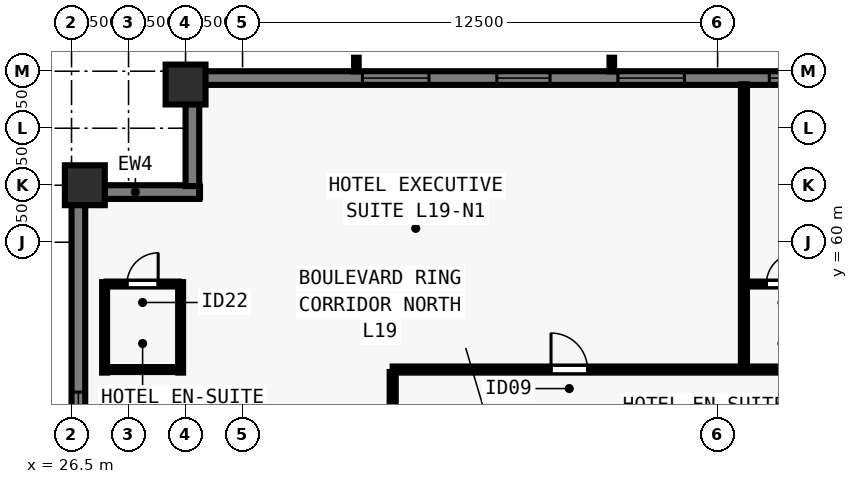
"""IFC4 building model, lengths in metres.
Left out: names, types, materials, properties, quantities, classifications, styles, units other than length and angle.
Written with IfcOpenShell. Run it as: python <this file> out.ifc"""

import sys

from ifc_helpers import new_model, si_unit, direction, frame, frame_2d, origin, origin_2d, place, context, subcontext, project, spatial, rectangle, extrude, element, fill, save


model = new_model("IFC4")
c1 = context("Model", 3, precision=1e-05, world=origin(), true_north=direction((0.0, 1.0)))
c2 = subcontext(c1, "Body", "Model", "MODEL_VIEW")
j1 = project(units=[si_unit("LENGTHUNIT", "METRE"), si_unit("PLANEANGLEUNIT", "RADIAN")], contexts=[c1])
p1 = place(None, origin())
s1 = spatial("IfcSite", under=j1, at=p1, CompositionType="ELEMENT")
p2 = place(p1, origin())
s2 = spatial("IfcBuilding", under=s1, at=p2, CompositionType="ELEMENT")
p3 = place(p2, frame((0.0, 0.0, 72.5)))
s3 = spatial("IfcBuildingStorey", under=s2, at=p3, CompositionType="ELEMENT", Elevation=72.5)
for number, where, z_axis, x_axis in (
    (1, (29.5, 64.15, 0.0), (0.0, 0.0, 1.0), (1.0, 0.0, 0.0)),
    (2, (26.85, 61.5, 0.0), (0.0, 0.0, 1.0), (0.0, 1.0, 0.0)),
):
    element("IfcColumn", number, at=place(p3, frame(where, z_axis=z_axis, x_axis=x_axis)), inside=s3, PredefinedType="COLUMN", context=c2, shape_type="SweptSolid", body=[
        extrude(rectangle(XDim=1.05, YDim=1.05, at=origin_2d()), origin(), (0.0, 0.0, 1.0), 3.5),
    ])
p4 = place(p3, frame((26.68, 16.5, 0.0), z_axis=(0.0, 0.0, 1.0), x_axis=(0.0, 1.0, 0.0)))
e3 = element("IfcWall", 3, at=p4, inside=s3, PredefinedType="SOLIDWALL", context=c2, shape_type="SweptSolid", body=[
    extrude(rectangle(XDim=44.662, YDim=0.36, at=frame_2d((22.331, 0.0))), origin(), (0.0, 0.0, 1.0), 3.28),
])
p5 = place(p4, frame((5.505, 0.0, 0.8)))
e4 = element("IfcOpeningElement", 4, at=p5, cuts=e3, PredefinedType="OPENING", context=c2, shape_type="SweptSolid", body=[
    extrude(rectangle(XDim=1.75, YDim=1.544, at=frame_2d((0.875, 0.772))), frame((0.0, 0.19, 0.0), z_axis=(0.0, -1.0, 0.0), x_axis=(1.0, 0.0, 0.0)), (0.0, 0.0, 1.0), 0.38),
])
p6 = place(p4, frame((8.19, 0.0, 0.8)))
e5 = element("IfcOpeningElement", 5, at=p6, cuts=e3, PredefinedType="OPENING", context=c2, shape_type="SweptSolid", body=[
    extrude(rectangle(XDim=1.4, YDim=1.544, at=frame_2d((0.7, 0.772))), frame((0.0, 0.19, 0.0), z_axis=(0.0, -1.0, 0.0), x_axis=(1.0, 0.0, 0.0)), (0.0, 0.0, 1.0), 0.38),
])
p7 = place(p4, frame((11.375, 0.0, 0.8)))
e6 = element("IfcOpeningElement", 6, at=p7, cuts=e3, PredefinedType="OPENING", context=c2, shape_type="SweptSolid", body=[
    extrude(rectangle(XDim=1.75, YDim=1.544, at=frame_2d((0.875, 0.772))), frame((0.0, 0.19, 0.0), z_axis=(0.0, -1.0, 0.0), x_axis=(1.0, 0.0, 0.0)), (0.0, 0.0, 1.0), 0.38),
])
p8 = place(p4, frame((14.911, 0.0, 0.8)))
e7 = element("IfcOpeningElement", 7, at=p8, cuts=e3, PredefinedType="OPENING", context=c2, shape_type="SweptSolid", body=[
    extrude(rectangle(XDim=1.4, YDim=1.544, at=frame_2d((0.7, 0.772))), frame((0.0, 0.19, 0.0), z_axis=(0.0, -1.0, 0.0), x_axis=(1.0, 0.0, 0.0)), (0.0, 0.0, 1.0), 0.38),
])
p9 = place(p4, frame((18.546, 0.0, 0.8)))
e8 = element("IfcOpeningElement", 8, at=p9, cuts=e3, PredefinedType="OPENING", context=c2, shape_type="SweptSolid", body=[
    extrude(rectangle(XDim=1.75, YDim=1.544, at=frame_2d((0.875, 0.772))), frame((0.0, 0.19, 0.0), z_axis=(0.0, -1.0, 0.0), x_axis=(1.0, 0.0, 0.0)), (0.0, 0.0, 1.0), 0.38),
])
p10 = place(p4, frame((22.481, 0.0, 0.8)))
e9 = element("IfcOpeningElement", 9, at=p10, cuts=e3, PredefinedType="OPENING", context=c2, shape_type="SweptSolid", body=[
    extrude(rectangle(XDim=1.4, YDim=1.544, at=frame_2d((0.7, 0.772))), frame((0.0, 0.19, 0.0), z_axis=(0.0, -1.0, 0.0), x_axis=(1.0, 0.0, 0.0)), (0.0, 0.0, 1.0), 0.38),
])
p11 = place(p4, frame((24.366, 0.0, 0.8)))
e10 = element("IfcOpeningElement", 10, at=p11, cuts=e3, PredefinedType="OPENING", context=c2, shape_type="SweptSolid", body=[
    extrude(rectangle(XDim=1.75, YDim=1.544, at=frame_2d((0.875, 0.772))), frame((0.0, 0.19, 0.0), z_axis=(0.0, -1.0, 0.0), x_axis=(1.0, 0.0, 0.0)), (0.0, 0.0, 1.0), 0.38),
])
p12 = place(p4, frame((28.351, 0.0, 0.8)))
e11 = element("IfcOpeningElement", 11, at=p12, cuts=e3, PredefinedType="OPENING", context=c2, shape_type="SweptSolid", body=[
    extrude(rectangle(XDim=1.4, YDim=1.544, at=frame_2d((0.7, 0.772))), frame((0.0, 0.19, 0.0), z_axis=(0.0, -1.0, 0.0), x_axis=(1.0, 0.0, 0.0)), (0.0, 0.0, 1.0), 0.38),
])
p13 = place(p4, frame((31.537, 0.0, 0.8)))
e12 = element("IfcOpeningElement", 12, at=p13, cuts=e3, PredefinedType="OPENING", context=c2, shape_type="SweptSolid", body=[
    extrude(rectangle(XDim=1.75, YDim=1.544, at=frame_2d((0.875, 0.772))), frame((0.0, 0.19, 0.0), z_axis=(0.0, -1.0, 0.0), x_axis=(1.0, 0.0, 0.0)), (0.0, 0.0, 1.0), 0.38),
])
p14 = place(p4, frame((35.072, 0.0, 0.8)))
e13 = element("IfcOpeningElement", 13, at=p14, cuts=e3, PredefinedType="OPENING", context=c2, shape_type="SweptSolid", body=[
    extrude(rectangle(XDim=1.4, YDim=1.544, at=frame_2d((0.7, 0.772))), frame((0.0, 0.19, 0.0), z_axis=(0.0, -1.0, 0.0), x_axis=(1.0, 0.0, 0.0)), (0.0, 0.0, 1.0), 0.38),
])
p15 = place(p4, frame((37.807, 0.0, 0.8)))
e14 = element("IfcOpeningElement", 14, at=p15, cuts=e3, PredefinedType="OPENING", context=c2, shape_type="SweptSolid", body=[
    extrude(rectangle(XDim=1.75, YDim=1.544, at=frame_2d((0.875, 0.772))), frame((0.0, 0.19, 0.0), z_axis=(0.0, -1.0, 0.0), x_axis=(1.0, 0.0, 0.0)), (0.0, 0.0, 1.0), 0.38),
])
p16 = place(p3, frame((26.5, 61.32, 0.0), z_axis=(0.0, 0.0, 1.0), x_axis=(1.0, 0.0, 0.0)))
e15 = element("IfcWall", 15, at=p16, inside=s3, PredefinedType="SOLIDWALL", context=c2, shape_type="SweptSolid", body=[
    extrude(rectangle(XDim=3.36, YDim=0.36, at=frame_2d((1.68, 0.0))), origin(), (0.0, 0.0, 1.0), 3.28),
])
p17 = place(p3, frame((29.68, 61.478, 0.0), z_axis=(0.0, 0.0, 1.0), x_axis=(0.0, 1.0, 0.0)))
e16 = element("IfcWall", 16, at=p17, inside=s3, PredefinedType="SOLIDWALL", context=c2, shape_type="SweptSolid", body=[
    extrude(rectangle(XDim=2.684, YDim=0.36, at=frame_2d((1.342, 0.0))), origin(), (0.0, 0.0, 1.0), 3.28),
])
p18 = place(p3, frame((29.5, 64.32, 0.0), z_axis=(0.0, 0.0, 1.0), x_axis=(1.0, 0.0, 0.0)))
e17 = element("IfcWall", 17, at=p18, inside=s3, PredefinedType="SOLIDWALL", context=c2, shape_type="SweptSolid", body=[
    extrude(rectangle(XDim=44.662, YDim=0.36, at=frame_2d((22.331, 0.0))), origin(), (0.0, 0.0, 1.0), 3.28),
])
p19 = place(p18, frame((4.655, 0.0, 0.8)))
e18 = element("IfcOpeningElement", 18, at=p19, cuts=e17, PredefinedType="OPENING", context=c2, shape_type="SweptSolid", body=[
    extrude(rectangle(XDim=1.75, YDim=1.544, at=frame_2d((0.875, 0.772))), frame((0.0, 0.19, 0.0), z_axis=(0.0, -1.0, 0.0), x_axis=(1.0, 0.0, 0.0)), (0.0, 0.0, 1.0), 0.38),
])
p20 = place(p18, frame((8.19, 0.0, 0.8)))
e19 = element("IfcOpeningElement", 19, at=p20, cuts=e17, PredefinedType="OPENING", context=c2, shape_type="SweptSolid", body=[
    extrude(rectangle(XDim=1.4, YDim=1.544, at=frame_2d((0.7, 0.772))), frame((0.0, 0.19, 0.0), z_axis=(0.0, -1.0, 0.0), x_axis=(1.0, 0.0, 0.0)), (0.0, 0.0, 1.0), 0.38),
])
p21 = place(p18, frame((11.375, 0.0, 0.8)))
e20 = element("IfcOpeningElement", 20, at=p21, cuts=e17, PredefinedType="OPENING", context=c2, shape_type="SweptSolid", body=[
    extrude(rectangle(XDim=1.75, YDim=1.544, at=frame_2d((0.875, 0.772))), frame((0.0, 0.19, 0.0), z_axis=(0.0, -1.0, 0.0), x_axis=(1.0, 0.0, 0.0)), (0.0, 0.0, 1.0), 0.38),
])
p22 = place(p18, frame((15.361, 0.0, 0.8)))
e21 = element("IfcOpeningElement", 21, at=p22, cuts=e17, PredefinedType="OPENING", context=c2, shape_type="SweptSolid", body=[
    extrude(rectangle(XDim=1.4, YDim=1.544, at=frame_2d((0.7, 0.772))), frame((0.0, 0.19, 0.0), z_axis=(0.0, -1.0, 0.0), x_axis=(1.0, 0.0, 0.0)), (0.0, 0.0, 1.0), 0.38),
])
p23 = place(p18, frame((18.546, 0.0, 0.8)))
e22 = element("IfcOpeningElement", 22, at=p23, cuts=e17, PredefinedType="OPENING", context=c2, shape_type="SweptSolid", body=[
    extrude(rectangle(XDim=1.75, YDim=1.544, at=frame_2d((0.875, 0.772))), frame((0.0, 0.19, 0.0), z_axis=(0.0, -1.0, 0.0), x_axis=(1.0, 0.0, 0.0)), (0.0, 0.0, 1.0), 0.38),
])
p24 = place(p18, frame((21.631, 0.0, 0.8)))
e23 = element("IfcOpeningElement", 23, at=p24, cuts=e17, PredefinedType="OPENING", context=c2, shape_type="SweptSolid", body=[
    extrude(rectangle(XDim=1.4, YDim=1.544, at=frame_2d((0.7, 0.772))), frame((0.0, 0.19, 0.0), z_axis=(0.0, -1.0, 0.0), x_axis=(1.0, 0.0, 0.0)), (0.0, 0.0, 1.0), 0.38),
])
p25 = place(p18, frame((24.366, 0.0, 0.8)))
e24 = element("IfcOpeningElement", 24, at=p25, cuts=e17, PredefinedType="OPENING", context=c2, shape_type="SweptSolid", body=[
    extrude(rectangle(XDim=1.75, YDim=1.544, at=frame_2d((0.875, 0.772))), frame((0.0, 0.19, 0.0), z_axis=(0.0, -1.0, 0.0), x_axis=(1.0, 0.0, 0.0)), (0.0, 0.0, 1.0), 0.38),
])
p26 = place(p18, frame((28.351, 0.0, 0.8)))
e25 = element("IfcOpeningElement", 25, at=p26, cuts=e17, PredefinedType="OPENING", context=c2, shape_type="SweptSolid", body=[
    extrude(rectangle(XDim=1.4, YDim=1.544, at=frame_2d((0.7, 0.772))), frame((0.0, 0.19, 0.0), z_axis=(0.0, -1.0, 0.0), x_axis=(1.0, 0.0, 0.0)), (0.0, 0.0, 1.0), 0.38),
])
p27 = place(p18, frame((31.537, 0.0, 0.8)))
e26 = element("IfcOpeningElement", 26, at=p27, cuts=e17, PredefinedType="OPENING", context=c2, shape_type="SweptSolid", body=[
    extrude(rectangle(XDim=1.75, YDim=1.544, at=frame_2d((0.875, 0.772))), frame((0.0, 0.19, 0.0), z_axis=(0.0, -1.0, 0.0), x_axis=(1.0, 0.0, 0.0)), (0.0, 0.0, 1.0), 0.38),
])
p28 = place(p18, frame((35.072, 0.0, 0.8)))
e27 = element("IfcOpeningElement", 27, at=p28, cuts=e17, PredefinedType="OPENING", context=c2, shape_type="SweptSolid", body=[
    extrude(rectangle(XDim=1.4, YDim=1.544, at=frame_2d((0.7, 0.772))), frame((0.0, 0.19, 0.0), z_axis=(0.0, -1.0, 0.0), x_axis=(1.0, 0.0, 0.0)), (0.0, 0.0, 1.0), 0.38),
])
p29 = place(p18, frame((38.257, 0.0, 0.8)))
e28 = element("IfcOpeningElement", 28, at=p29, cuts=e17, PredefinedType="OPENING", context=c2, shape_type="SweptSolid", body=[
    extrude(rectangle(XDim=1.75, YDim=1.544, at=frame_2d((0.875, 0.772))), frame((0.0, 0.19, 0.0), z_axis=(0.0, -1.0, 0.0), x_axis=(1.0, 0.0, 0.0)), (0.0, 0.0, 1.0), 0.38),
])
p30 = place(p3, frame((34.95, 56.65, 0.0), z_axis=(0.0, 0.0, 1.0), x_axis=(1.0, 0.0, 0.0)))
e29 = element("IfcWall", 29, at=p30, inside=s3, PredefinedType="PARTITIONING", context=c2, shape_type="SweptSolid", body=[
    extrude(rectangle(XDim=34.1, YDim=0.16, at=frame_2d((17.05, 0.0))), origin(), (0.0, 0.0, 1.0), 3.28),
])
p31 = place(p30, frame((4.166, 0.0, 0.0)))
e30 = element("IfcOpeningElement", 30, at=p31, cuts=e29, PredefinedType="OPENING", context=c2, shape_type="SweptSolid", body=[
    extrude(rectangle(XDim=0.96, YDim=2.15, at=frame_2d((0.48, 1.075))), frame((0.0, 0.09, 0.0), z_axis=(0.0, -1.0, 0.0), x_axis=(1.0, 0.0, 0.0)), (0.0, 0.0, 1.0), 0.18),
])
p32 = place(p30, frame((17.73, 0.0, 0.0)))
e31 = element("IfcOpeningElement", 31, at=p32, cuts=e29, PredefinedType="OPENING", context=c2, shape_type="SweptSolid", body=[
    extrude(rectangle(XDim=0.96, YDim=2.15, at=frame_2d((0.48, 1.075))), frame((0.0, 0.09, 0.0), z_axis=(0.0, -1.0, 0.0), x_axis=(1.0, 0.0, 0.0)), (0.0, 0.0, 1.0), 0.18),
])
p33 = place(p30, frame((30.134, 0.0, 0.0)))
e32 = element("IfcOpeningElement", 32, at=p33, cuts=e29, PredefinedType="OPENING", context=c2, shape_type="SweptSolid", body=[
    extrude(rectangle(XDim=0.96, YDim=2.15, at=frame_2d((0.48, 1.075))), frame((0.0, 0.09, 0.0), z_axis=(0.0, -1.0, 0.0), x_axis=(1.0, 0.0, 0.0)), (0.0, 0.0, 1.0), 0.18),
])
p34 = place(p3, frame((34.95, 21.415, 0.0), z_axis=(0.0, 0.0, 1.0), x_axis=(0.0, 1.0, 0.0)))
e33 = element("IfcWall", 33, at=p34, inside=s3, PredefinedType="PARTITIONING", context=c2, shape_type="SweptSolid", body=[
    extrude(rectangle(XDim=35.17, YDim=0.16, at=frame_2d((17.585, 0.0))), origin(), (0.0, 0.0, 1.0), 3.28),
])
p35 = place(p34, frame((9.414, 0.0, 0.0)))
e34 = element("IfcOpeningElement", 34, at=p35, cuts=e33, PredefinedType="OPENING", context=c2, shape_type="SweptSolid", body=[
    extrude(rectangle(XDim=0.96, YDim=2.15, at=frame_2d((0.48, 1.075))), frame((0.0, 0.09, 0.0), z_axis=(0.0, -1.0, 0.0), x_axis=(1.0, 0.0, 0.0)), (0.0, 0.0, 1.0), 0.18),
])
p36 = place(p34, frame((26.814, 0.0, 0.0)))
e35 = element("IfcOpeningElement", 35, at=p36, cuts=e33, PredefinedType="OPENING", context=c2, shape_type="SweptSolid", body=[
    extrude(rectangle(XDim=0.96, YDim=2.15, at=frame_2d((0.48, 1.075))), frame((0.0, 0.09, 0.0), z_axis=(0.0, -1.0, 0.0), x_axis=(1.0, 0.0, 0.0)), (0.0, 0.0, 1.0), 0.18),
])
for number, where, z_axis, x_axis in (
    (36, (27.37, 56.57, 0.0), (0.0, 0.0, 1.0), (0.0, 1.0, 0.0)),
    (37, (29.37, 56.57, 0.0), (0.0, 0.0, 1.0), (0.0, 1.0, 0.0)),
):
    element("IfcWall", number, at=place(p3, frame(where, z_axis=z_axis, x_axis=x_axis)), inside=s3, PredefinedType="PLUMBINGWALL", context=c2, shape_type="SweptSolid", body=[
        extrude(rectangle(XDim=2.38, YDim=0.13, at=frame_2d((1.19, 0.0))), origin(), (0.0, 0.0, 1.0), 3.28),
    ])
p37 = place(p3, frame((27.42, 58.9, 0.0), z_axis=(0.0, 0.0, 1.0), x_axis=(1.0, 0.0, 0.0)))
e38 = element("IfcWall", 38, at=p37, inside=s3, PredefinedType="PLUMBINGWALL", context=c2, shape_type="SweptSolid", body=[
    extrude(rectangle(XDim=1.9, YDim=0.13, at=frame_2d((0.95, 0.0))), origin(), (0.0, 0.0, 1.0), 3.28),
])
p38 = place(p37, frame((0.54, 0.0, 0.0)))
e39 = element("IfcOpeningElement", 39, at=p38, cuts=e38, PredefinedType="OPENING", context=c2, shape_type="SweptSolid", body=[
    extrude(rectangle(XDim=0.82, YDim=2.1, at=frame_2d((0.41, 1.05))), frame((0.0, 0.075, 0.0), z_axis=(0.0, -1.0, 0.0), x_axis=(1.0, 0.0, 0.0)), (0.0, 0.0, 1.0), 0.15),
])
p39 = place(p3, frame((27.42, 56.65, 0.0), z_axis=(0.0, 0.0, 1.0), x_axis=(1.0, 0.0, 0.0)))
e40 = element("IfcWall", 40, at=p39, inside=s3, PredefinedType="PLUMBINGWALL", context=c2, shape_type="SweptSolid", body=[
    extrude(rectangle(XDim=1.9, YDim=0.13, at=frame_2d((0.95, 0.0))), origin(), (0.0, 0.0, 1.0), 3.28),
])
p40 = place(p3, frame((44.192, 56.715, 0.0), z_axis=(0.0, 0.0, 1.0), x_axis=(0.0, 1.0, 0.0)))
e41 = element("IfcWall", 41, at=p40, inside=s3, PredefinedType="PARTITIONING", context=c2, shape_type="SweptSolid", body=[
    extrude(rectangle(XDim=7.44, YDim=0.16, at=frame_2d((3.72, 0.0))), origin(), (0.0, 0.0, 1.0), 3.28),
])
p41 = place(p3, frame((44.258, 58.9, 0.0), z_axis=(0.0, 0.0, 1.0), x_axis=(1.0, 0.0, 0.0)))
e42 = element("IfcWall", 42, at=p41, inside=s3, PredefinedType="PLUMBINGWALL", context=c2, shape_type="SweptSolid", body=[
    extrude(rectangle(XDim=1.885, YDim=0.13, at=frame_2d((0.942, 0.0))), origin(), (0.0, 0.0, 1.0), 3.28),
])
p42 = place(p41, frame((0.525, 0.0, 0.0)))
e43 = element("IfcOpeningElement", 43, at=p42, cuts=e42, PredefinedType="OPENING", context=c2, shape_type="SweptSolid", body=[
    extrude(rectangle(XDim=0.82, YDim=2.1, at=frame_2d((0.41, 1.05))), frame((0.0, 0.075, 0.0), z_axis=(0.0, -1.0, 0.0), x_axis=(1.0, 0.0, 0.0)), (0.0, 0.0, 1.0), 0.15),
])
p43 = place(p15, origin())
e44 = element("IfcWindow", 44, at=p43, inside=s3, PartitioningType="SINGLE_PANEL", PredefinedType="WINDOW", context=c2, shape_type="SweptSolid", body=[
    extrude(rectangle(XDim=1.75, YDim=1.544, at=frame_2d((0.875, 0.772))), frame((0.0, -0.05, 0.0), z_axis=(0.0, -1.0, 0.0), x_axis=(1.0, 0.0, 0.0)), (0.0, 0.0, 1.0), 0.06),
])
fill(e14, e44)
p44 = place(p19, origin())
e45 = element("IfcWindow", 45, at=p44, inside=s3, PartitioningType="SINGLE_PANEL", PredefinedType="WINDOW", context=c2, shape_type="SweptSolid", body=[
    extrude(rectangle(XDim=1.75, YDim=1.544, at=frame_2d((0.875, 0.772))), frame((0.0, -0.05, 0.0), z_axis=(0.0, -1.0, 0.0), x_axis=(1.0, 0.0, 0.0)), (0.0, 0.0, 1.0), 0.06),
])
fill(e18, e45)
p45 = place(p20, origin())
e46 = element("IfcWindow", 46, at=p45, inside=s3, PartitioningType="SINGLE_PANEL", PredefinedType="WINDOW", context=c2, shape_type="SweptSolid", body=[
    extrude(rectangle(XDim=1.4, YDim=1.544, at=frame_2d((0.7, 0.772))), frame((0.0, -0.05, 0.0), z_axis=(0.0, -1.0, 0.0), x_axis=(1.0, 0.0, 0.0)), (0.0, 0.0, 1.0), 0.06),
])
fill(e19, e46)
p46 = place(p21, origin())
e47 = element("IfcWindow", 47, at=p46, inside=s3, PartitioningType="SINGLE_PANEL", PredefinedType="WINDOW", context=c2, shape_type="SweptSolid", body=[
    extrude(rectangle(XDim=1.75, YDim=1.544, at=frame_2d((0.875, 0.772))), frame((0.0, -0.05, 0.0), z_axis=(0.0, -1.0, 0.0), x_axis=(1.0, 0.0, 0.0)), (0.0, 0.0, 1.0), 0.06),
])
fill(e20, e47)
p47 = place(p22, origin())
e48 = element("IfcWindow", 48, at=p47, inside=s3, PartitioningType="SINGLE_PANEL", PredefinedType="WINDOW", context=c2, shape_type="SweptSolid", body=[
    extrude(rectangle(XDim=1.4, YDim=1.544, at=frame_2d((0.7, 0.772))), frame((0.0, -0.05, 0.0), z_axis=(0.0, -1.0, 0.0), x_axis=(1.0, 0.0, 0.0)), (0.0, 0.0, 1.0), 0.06),
])
fill(e21, e48)
p48 = place(p38, origin())
e49 = element("IfcDoor", 49, at=p48, inside=s3, OperationType="SINGLE_SWING_RIGHT", PredefinedType="DOOR", context=c2, shape_type="SweptSolid", body=[
    extrude(rectangle(XDim=0.82, YDim=2.1, at=frame_2d((0.41, 1.05))), frame((0.0, 0.025, 0.0), z_axis=(0.0, -1.0, 0.0), x_axis=(1.0, 0.0, 0.0)), (0.0, 0.0, 1.0), 0.05),
])
fill(e39, e49)
p49 = place(p31, origin())
e50 = element("IfcDoor", 50, at=p49, inside=s3, OperationType="SINGLE_SWING_LEFT", PredefinedType="DOOR", context=c2, shape_type="SweptSolid", body=[
    extrude(rectangle(XDim=0.96, YDim=2.15, at=frame_2d((0.48, 1.075))), frame((0.0, 0.025, 0.0), z_axis=(0.0, -1.0, 0.0), x_axis=(1.0, 0.0, 0.0)), (0.0, 0.0, 1.0), 0.05),
])
fill(e30, e50)
p50 = place(p42, origin())
e51 = element("IfcDoor", 51, at=p50, inside=s3, OperationType="SINGLE_SWING_RIGHT", PredefinedType="DOOR", context=c2, shape_type="SweptSolid", body=[
    extrude(rectangle(XDim=0.82, YDim=2.1, at=frame_2d((0.41, 1.05))), frame((0.0, 0.025, 0.0), z_axis=(0.0, -1.0, 0.0), x_axis=(1.0, 0.0, 0.0)), (0.0, 0.0, 1.0), 0.05),
])
fill(e43, e51)
save(model, sys.argv[1])
